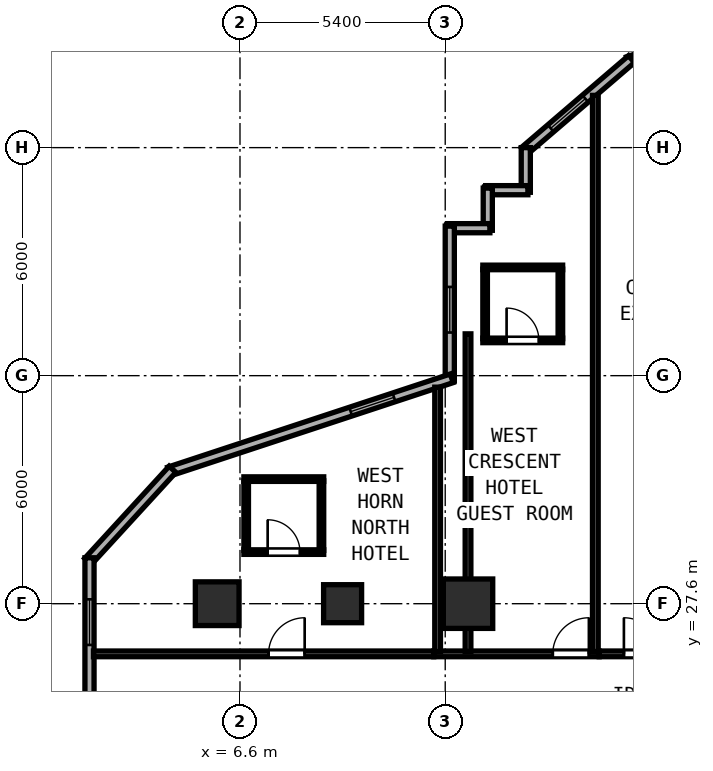
"""IFC4 building model, lengths in metres.
Left out: names, types, materials, properties, quantities, classifications, styles, units other than length and angle.
Written with IfcOpenShell. Run it as: python <this file> out.ifc"""

import sys

from ifc_helpers import new_model, si_unit, direction, frame, frame_2d, origin, origin_2d, place, context, subcontext, project, spatial, rectangle, hollow_rectangle, extrude, element, fill, save


model = new_model("IFC4")
c1 = context("Model", 3, precision=1e-05, world=origin(), true_north=direction((0.0, 1.0)))
c2 = subcontext(c1, "Body", "Model", "MODEL_VIEW")
j1 = project(units=[si_unit("LENGTHUNIT", "METRE"), si_unit("PLANEANGLEUNIT", "RADIAN")], contexts=[c1])
p1 = place(None, origin())
s1 = spatial("IfcSite", under=j1, at=p1, CompositionType="ELEMENT")
p2 = place(p1, origin())
s2 = spatial("IfcBuilding", under=s1, at=p2, CompositionType="ELEMENT")
p3 = place(p2, frame((0.0, 0.0, 39.2)))
s3 = spatial("IfcBuildingStorey", under=s2, at=p3, CompositionType="ELEMENT", Elevation=39.2)
p4 = place(p3, frame((12.6, 27.6, 0.0), z_axis=(0.0, 0.0, 1.0), x_axis=(1.0, 0.0, 0.0)))
e1 = element("IfcColumn", 1, at=p4, inside=s3, PredefinedType="COLUMN", context=c2, shape_type="SweptSolid", body=[
    extrude(hollow_rectangle(XDim=1.3, YDim=1.3, WallThickness=0.048, at=origin_2d()), origin(), (0.0, 0.0, 1.0), 3.8),
])
p5 = place(p3, frame((6.0, 27.6, 0.0), z_axis=(0.0, 0.0, 1.0), x_axis=(1.0, 0.0, 0.0)))
e2 = element("IfcColumn", 2, at=p5, inside=s3, PredefinedType="COLUMN", context=c2, shape_type="SweptSolid", body=[
    extrude(hollow_rectangle(XDim=1.15, YDim=1.15, WallThickness=0.042, at=origin_2d()), origin(), (0.0, 0.0, 1.0), 3.8),
])
p6 = place(p3, frame((9.3, 27.6, 0.0), z_axis=(0.0, 0.0, 1.0), x_axis=(1.0, 0.0, 0.0)))
e3 = element("IfcColumn", 3, at=p6, inside=s3, PredefinedType="COLUMN", context=c2, shape_type="SweptSolid", body=[
    extrude(hollow_rectangle(XDim=1.0, YDim=1.0, WallThickness=0.038, at=origin_2d()), origin(), (0.0, 0.0, 1.0), 3.8),
])
p7 = place(p3, frame((17.808, 42.209, 0.0), z_axis=(0.0, 0.0, 1.0), x_axis=(-0.948706457285, -0.316158279832, 0.0)))
e4 = element("IfcWall", 4, at=p7, inside=s3, PredefinedType="SOLIDWALL", context=c2, shape_type="SweptSolid", body=[
    extrude(rectangle(XDim=1.054, YDim=0.24, at=frame_2d((0.527, 0.0))), origin(), (0.0, 0.0, 1.0), 3.54),
])
p8 = place(p3, frame((16.902, 41.929, 0.0), z_axis=(0.0, 0.0, 1.0), x_axis=(-0.759275136126, -0.650769750112, 0.0)))
e5 = element("IfcWall", 5, at=p8, inside=s3, PredefinedType="SOLIDWALL", context=c2, shape_type="SweptSolid", body=[
    extrude(rectangle(XDim=3.719, YDim=0.24, at=frame_2d((1.86, 0.0))), origin(), (0.0, 0.0, 1.0), 3.54),
])
p9 = place(p8, frame((1.6, 0.0, 0.85)))
e6 = element("IfcOpeningElement", 6, at=p9, cuts=e5, PredefinedType="OPENING", context=c2, shape_type="SweptSolid", body=[
    extrude(rectangle(XDim=1.2, YDim=1.85, at=frame_2d((0.6, 0.925))), frame((0.0, 0.13, 0.0), z_axis=(0.0, -1.0, 0.0), x_axis=(1.0, 0.0, 0.0)), (0.0, 0.0, 1.0), 0.26),
])
p10 = place(p3, frame((14.12, 39.6, 0.0), z_axis=(0.0, 0.0, 1.0), x_axis=(0.0, -1.0, 0.0)))
e7 = element("IfcWall", 7, at=p10, inside=s3, PredefinedType="SOLIDWALL", context=c2, shape_type="SweptSolid", body=[
    extrude(rectangle(XDim=1.175, YDim=0.24, at=frame_2d((0.587, 0.0))), origin(), (0.0, 0.0, 1.0), 3.54),
])
p11 = place(p3, frame((14.175, 38.48, 0.0), z_axis=(0.0, 0.0, 1.0), x_axis=(-1.0, 0.0, 0.0)))
e8 = element("IfcWall", 8, at=p11, inside=s3, PredefinedType="SOLIDWALL", context=c2, shape_type="SweptSolid", body=[
    extrude(rectangle(XDim=1.11, YDim=0.24, at=frame_2d((0.555, 0.0))), origin(), (0.0, 0.0, 1.0), 3.54),
])
p12 = place(p3, frame((13.12, 38.535, 0.0), z_axis=(0.0, 0.0, 1.0), x_axis=(0.0, -1.0, 0.0)))
e9 = element("IfcWall", 9, at=p12, inside=s3, PredefinedType="SOLIDWALL", context=c2, shape_type="SweptSolid", body=[
    extrude(rectangle(XDim=1.11, YDim=0.24, at=frame_2d((0.555, 0.0))), origin(), (0.0, 0.0, 1.0), 3.54),
])
p13 = place(p3, frame((13.175, 37.48, 0.0), z_axis=(0.0, 0.0, 1.0), x_axis=(-1.0, 0.0, 0.0)))
e10 = element("IfcWall", 10, at=p13, inside=s3, PredefinedType="SOLIDWALL", context=c2, shape_type="SweptSolid", body=[
    extrude(rectangle(XDim=1.11, YDim=0.24, at=frame_2d((0.555, 0.0))), origin(), (0.0, 0.0, 1.0), 3.54),
])
p14 = place(p3, frame((12.12, 37.535, 0.0), z_axis=(0.0, 0.0, 1.0), x_axis=(0.0, -1.0, 0.0)))
e11 = element("IfcWall", 11, at=p14, inside=s3, PredefinedType="SOLIDWALL", context=c2, shape_type="SweptSolid", body=[
    extrude(rectangle(XDim=4.077, YDim=0.24, at=frame_2d((2.038, 0.0))), origin(), (0.0, 0.0, 1.0), 3.54),
])
p15 = place(p14, frame((1.6, 0.0, 0.85)))
e12 = element("IfcOpeningElement", 12, at=p15, cuts=e11, PredefinedType="OPENING", context=c2, shape_type="SweptSolid", body=[
    extrude(rectangle(XDim=1.2, YDim=1.85, at=frame_2d((0.6, 0.925))), frame((0.0, 0.13, 0.0), z_axis=(0.0, -1.0, 0.0), x_axis=(1.0, 0.0, 0.0)), (0.0, 0.0, 1.0), 0.26),
])
p16 = place(p3, frame((12.172, 33.531, 0.0), z_axis=(0.0, 0.0, 1.0), x_axis=(-0.949716382283, -0.313111470923, 0.0)))
e13 = element("IfcWall", 13, at=p16, inside=s3, PredefinedType="SOLIDWALL", context=c2, shape_type="SweptSolid", body=[
    extrude(rectangle(XDim=7.831, YDim=0.24, at=frame_2d((3.916, 0.0))), origin(), (0.0, 0.0, 1.0), 3.54),
])
p17 = place(p16, frame((1.6, 0.0, 0.85)))
e14 = element("IfcOpeningElement", 14, at=p17, cuts=e13, PredefinedType="OPENING", context=c2, shape_type="SweptSolid", body=[
    extrude(rectangle(XDim=1.2, YDim=1.85, at=frame_2d((0.6, 0.925))), frame((0.0, 0.13, 0.0), z_axis=(0.0, -1.0, 0.0), x_axis=(1.0, 0.0, 0.0)), (0.0, 0.0, 1.0), 0.26),
])
p18 = place(p3, frame((4.824, 31.136, 0.0), z_axis=(0.0, 0.0, 1.0), x_axis=(-0.675771705575, -0.737110983465, 0.0)))
e15 = element("IfcWall", 15, at=p18, inside=s3, PredefinedType="SOLIDWALL", context=c2, shape_type="SweptSolid", body=[
    extrude(rectangle(XDim=3.288, YDim=0.24, at=frame_2d((1.644, 0.0))), origin(), (0.0, 0.0, 1.0), 3.54),
])
p19 = place(p3, frame((2.64, 28.808, 0.0), z_axis=(0.0, 0.0, 1.0), x_axis=(0.0, -1.0, 0.0)))
e16 = element("IfcWall", 16, at=p19, inside=s3, PredefinedType="SOLIDWALL", context=c2, shape_type="SweptSolid", body=[
    extrude(rectangle(XDim=20.349, YDim=0.24, at=frame_2d((10.175, 0.0))), origin(), (0.0, 0.0, 1.0), 3.54),
])
p20 = place(p19, frame((1.093, 0.0, 0.85)))
e17 = element("IfcOpeningElement", 17, at=p20, cuts=e16, PredefinedType="OPENING", context=c2, shape_type="SweptSolid", body=[
    extrude(rectangle(XDim=1.2, YDim=1.85, at=frame_2d((0.6, 0.925))), frame((0.0, 0.13, 0.0), z_axis=(0.0, -1.0, 0.0), x_axis=(1.0, 0.0, 0.0)), (0.0, 0.0, 1.0), 0.26),
])
p21 = place(p19, frame((7.0, 0.0, 0.85)))
e18 = element("IfcOpeningElement", 18, at=p21, cuts=e16, PredefinedType="OPENING", context=c2, shape_type="SweptSolid", body=[
    extrude(rectangle(XDim=1.2, YDim=1.85, at=frame_2d((0.6, 0.925))), frame((0.0, 0.13, 0.0), z_axis=(0.0, -1.0, 0.0), x_axis=(1.0, 0.0, 0.0)), (0.0, 0.0, 1.0), 0.26),
])
p22 = place(p19, frame((12.4, 0.0, 0.85)))
e19 = element("IfcOpeningElement", 19, at=p22, cuts=e16, PredefinedType="OPENING", context=c2, shape_type="SweptSolid", body=[
    extrude(rectangle(XDim=1.2, YDim=1.85, at=frame_2d((0.6, 0.925))), frame((0.0, 0.13, 0.0), z_axis=(0.0, -1.0, 0.0), x_axis=(1.0, 0.0, 0.0)), (0.0, 0.0, 1.0), 0.26),
])
p23 = place(p19, frame((17.8, 0.0, 0.85)))
e20 = element("IfcOpeningElement", 20, at=p23, cuts=e16, PredefinedType="OPENING", context=c2, shape_type="SweptSolid", body=[
    extrude(rectangle(XDim=1.2, YDim=1.85, at=frame_2d((0.6, 0.925))), frame((0.0, 0.13, 0.0), z_axis=(0.0, -1.0, 0.0), x_axis=(1.0, 0.0, 0.0)), (0.0, 0.0, 1.0), 0.26),
])
p24 = place(p3, frame((11.7, 26.28, 0.0), z_axis=(0.0, 0.0, 1.0), x_axis=(1.0, 0.0, 0.0)))
e21 = element("IfcWall", 21, at=p24, inside=s3, PredefinedType="PARTITIONING", context=c2, shape_type="SweptSolid", body=[
    extrude(rectangle(XDim=4.35, YDim=0.15, at=frame_2d((2.175, 0.0))), origin(), (0.0, 0.0, 1.0), 3.54),
])
p25 = place(p24, frame((3.13, 0.0, 0.0)))
e22 = element("IfcOpeningElement", 22, at=p25, cuts=e21, PredefinedType="OPENING", context=c2, shape_type="SweptSolid", body=[
    extrude(rectangle(XDim=0.95, YDim=2.15, at=frame_2d((0.475, 1.075))), frame((0.0, 0.085, 0.0), z_axis=(0.0, -1.0, 0.0), x_axis=(1.0, 0.0, 0.0)), (0.0, 0.0, 1.0), 0.17),
])
p26 = place(p3, frame((11.8, 26.34, 0.0), z_axis=(0.0, 0.0, 1.0), x_axis=(0.0, 1.0, 0.0)))
e23 = element("IfcWall", 23, at=p26, inside=s3, PredefinedType="PARTITIONING", context=c2, shape_type="SweptSolid", body=[
    extrude(rectangle(XDim=6.957, YDim=0.15, at=frame_2d((3.479, 0.0))), origin(), (0.0, 0.0, 1.0), 3.54),
])
p27 = place(p3, frame((15.95, 26.34, 0.0), z_axis=(0.0, 0.0, 1.0), x_axis=(0.0, 1.0, 0.0)))
e24 = element("IfcWall", 24, at=p27, inside=s3, PredefinedType="PARTITIONING", context=c2, shape_type="SweptSolid", body=[
    extrude(rectangle(XDim=14.635, YDim=0.15, at=frame_2d((7.317, 0.0))), origin(), (0.0, 0.0, 1.0), 3.54),
])
p28 = place(p3, frame((12.99, 36.448, 0.0), z_axis=(0.0, 0.0, 1.0), x_axis=(1.0, 0.0, 0.0)))
e25 = element("IfcWall", 25, at=p28, inside=s3, PredefinedType="PARTITIONING", context=c2, shape_type="SweptSolid", body=[
    extrude(rectangle(XDim=2.1, YDim=0.12, at=frame_2d((1.05, 0.0))), origin(), (0.0, 0.0, 1.0), 3.54),
])
p29 = place(p3, frame((12.99, 34.528, 0.0), z_axis=(0.0, 0.0, 1.0), x_axis=(1.0, 0.0, 0.0)))
e26 = element("IfcWall", 26, at=p29, inside=s3, PredefinedType="PARTITIONING", context=c2, shape_type="SweptSolid", body=[
    extrude(rectangle(XDim=2.1, YDim=0.12, at=frame_2d((1.05, 0.0))), origin(), (0.0, 0.0, 1.0), 3.54),
])
p30 = place(p29, frame((0.625, 0.0, 0.0)))
e27 = element("IfcOpeningElement", 27, at=p30, cuts=e26, PredefinedType="OPENING", context=c2, shape_type="SweptSolid", body=[
    extrude(rectangle(XDim=0.85, YDim=2.1, at=frame_2d((0.425, 1.05))), frame((0.0, 0.07, 0.0), z_axis=(0.0, -1.0, 0.0), x_axis=(1.0, 0.0, 0.0)), (0.0, 0.0, 1.0), 0.14),
])
for number, where, z_axis, x_axis in (
    (28, (13.05, 34.573, 0.0), (0.0, 0.0, 1.0), (0.0, 1.0, 0.0)),
    (29, (15.03, 34.573, 0.0), (0.0, 0.0, 1.0), (0.0, 1.0, 0.0)),
):
    element("IfcWall", number, at=place(p3, frame(where, z_axis=z_axis, x_axis=x_axis)), inside=s3, PredefinedType="PARTITIONING", context=c2, shape_type="SweptSolid", body=[
        extrude(rectangle(XDim=1.83, YDim=0.12, at=frame_2d((0.915, 0.0))), origin(), (0.0, 0.0, 1.0), 3.54),
    ])
p31 = place(p3, frame((16.052, 26.28, 0.0), z_axis=(0.0, 0.0, 1.0), x_axis=(1.0, 0.0, 0.0)))
e30 = element("IfcWall", 30, at=p31, inside=s3, PredefinedType="PARTITIONING", context=c2, shape_type="SweptSolid", body=[
    extrude(rectangle(XDim=4.018, YDim=0.15, at=frame_2d((2.009, 0.0))), origin(), (0.0, 0.0, 1.0), 3.54),
])
p32 = place(p31, frame((0.649, 0.0, 0.0)))
e31 = element("IfcOpeningElement", 31, at=p32, cuts=e30, PredefinedType="OPENING", context=c2, shape_type="SweptSolid", body=[
    extrude(rectangle(XDim=0.95, YDim=2.18, at=frame_2d((0.475, 1.09))), frame((0.0, 0.085, 0.0), z_axis=(0.0, -1.0, 0.0), x_axis=(1.0, 0.0, 0.0)), (0.0, 0.0, 1.0), 0.17),
])
p33 = place(p3, frame((2.745, 26.28, 0.0), z_axis=(0.0, 0.0, 1.0), x_axis=(1.0, 0.0, 0.0)))
e32 = element("IfcWall", 32, at=p33, inside=s3, PredefinedType="PARTITIONING", context=c2, shape_type="SweptSolid", body=[
    extrude(rectangle(XDim=8.953, YDim=0.15, at=frame_2d((4.477, 0.0))), origin(), (0.0, 0.0, 1.0), 3.54),
])
p34 = place(p33, frame((4.607, 0.0, 0.0)))
e33 = element("IfcOpeningElement", 33, at=p34, cuts=e32, PredefinedType="OPENING", context=c2, shape_type="SweptSolid", body=[
    extrude(rectangle(XDim=0.95, YDim=2.15, at=frame_2d((0.475, 1.075))), frame((0.0, 0.085, 0.0), z_axis=(0.0, -1.0, 0.0), x_axis=(1.0, 0.0, 0.0)), (0.0, 0.0, 1.0), 0.17),
])
p35 = place(p3, frame((12.6, 26.34, 0.0), z_axis=(0.0, 0.0, 1.0), x_axis=(0.0, 1.0, 0.0)))
e34 = element("IfcWall", 34, at=p35, inside=s3, PredefinedType="PARTITIONING", context=c2, shape_type="SweptSolid", body=[
    extrude(rectangle(XDim=8.36, YDim=0.15, at=frame_2d((4.18, 0.0))), origin(), (0.0, 0.0, 1.0), 3.037),
])
p36 = place(p3, frame((6.703, 30.878, 0.0), z_axis=(0.0, 0.0, 1.0), x_axis=(1.0, 0.0, 0.0)))
e35 = element("IfcWall", 35, at=p36, inside=s3, PredefinedType="PARTITIONING", context=c2, shape_type="SweptSolid", body=[
    extrude(rectangle(XDim=2.1, YDim=0.12, at=frame_2d((1.05, 0.0))), origin(), (0.0, 0.0, 1.0), 3.54),
])
p37 = place(p3, frame((6.703, 28.958, 0.0), z_axis=(0.0, 0.0, 1.0), x_axis=(1.0, 0.0, 0.0)))
e36 = element("IfcWall", 36, at=p37, inside=s3, PredefinedType="PARTITIONING", context=c2, shape_type="SweptSolid", body=[
    extrude(rectangle(XDim=2.1, YDim=0.12, at=frame_2d((1.05, 0.0))), origin(), (0.0, 0.0, 1.0), 3.54),
])
p38 = place(p37, frame((0.625, 0.0, 0.0)))
e37 = element("IfcOpeningElement", 37, at=p38, cuts=e36, PredefinedType="OPENING", context=c2, shape_type="SweptSolid", body=[
    extrude(rectangle(XDim=0.85, YDim=2.1, at=frame_2d((0.425, 1.05))), frame((0.0, 0.07, 0.0), z_axis=(0.0, -1.0, 0.0), x_axis=(1.0, 0.0, 0.0)), (0.0, 0.0, 1.0), 0.14),
])
for number, where, z_axis, x_axis in (
    (38, (6.763, 29.003, 0.0), (0.0, 0.0, 1.0), (0.0, 1.0, 0.0)),
    (39, (8.743, 29.003, 0.0), (0.0, 0.0, 1.0), (0.0, 1.0, 0.0)),
):
    element("IfcWall", number, at=place(p3, frame(where, z_axis=z_axis, x_axis=x_axis)), inside=s3, PredefinedType="PARTITIONING", context=c2, shape_type="SweptSolid", body=[
        extrude(rectangle(XDim=1.83, YDim=0.12, at=frame_2d((0.915, 0.0))), origin(), (0.0, 0.0, 1.0), 3.54),
    ])
p39 = place(p9, origin())
e40 = element("IfcWindow", 40, at=p39, inside=s3, PartitioningType="SINGLE_PANEL", PredefinedType="WINDOW", context=c2, shape_type="SweptSolid", body=[
    extrude(rectangle(XDim=1.2, YDim=1.85, at=frame_2d((0.6, 0.925))), frame((0.0, 0.03, 0.0), z_axis=(0.0, -1.0, 0.0), x_axis=(1.0, 0.0, 0.0)), (0.0, 0.0, 1.0), 0.06),
])
fill(e6, e40)
p40 = place(p15, origin())
e41 = element("IfcWindow", 41, at=p40, inside=s3, PartitioningType="SINGLE_PANEL", PredefinedType="WINDOW", context=c2, shape_type="SweptSolid", body=[
    extrude(rectangle(XDim=1.2, YDim=1.85, at=frame_2d((0.6, 0.925))), frame((0.0, 0.03, 0.0), z_axis=(0.0, -1.0, 0.0), x_axis=(1.0, 0.0, 0.0)), (0.0, 0.0, 1.0), 0.06),
])
fill(e12, e41)
p41 = place(p17, origin())
e42 = element("IfcWindow", 42, at=p41, inside=s3, PartitioningType="SINGLE_PANEL", PredefinedType="WINDOW", context=c2, shape_type="SweptSolid", body=[
    extrude(rectangle(XDim=1.2, YDim=1.85, at=frame_2d((0.6, 0.925))), frame((0.0, 0.03, 0.0), z_axis=(0.0, -1.0, 0.0), x_axis=(1.0, 0.0, 0.0)), (0.0, 0.0, 1.0), 0.06),
])
fill(e14, e42)
p42 = place(p20, origin())
e43 = element("IfcWindow", 43, at=p42, inside=s3, PartitioningType="SINGLE_PANEL", PredefinedType="WINDOW", context=c2, shape_type="SweptSolid", body=[
    extrude(rectangle(XDim=1.2, YDim=1.85, at=frame_2d((0.6, 0.925))), frame((0.0, 0.03, 0.0), z_axis=(0.0, -1.0, 0.0), x_axis=(1.0, 0.0, 0.0)), (0.0, 0.0, 1.0), 0.06),
])
fill(e17, e43)
p43 = place(p25, origin())
e44 = element("IfcDoor", 44, at=p43, inside=s3, OperationType="SINGLE_SWING_RIGHT", PredefinedType="DOOR", context=c2, shape_type="SweptSolid", body=[
    extrude(rectangle(XDim=0.95, YDim=2.15, at=frame_2d((0.475, 1.075))), frame((0.0, 0.025, 0.0), z_axis=(0.0, -1.0, 0.0), x_axis=(1.0, 0.0, 0.0)), (0.0, 0.0, 1.0), 0.05),
])
fill(e22, e44)
p44 = place(p30, origin())
e45 = element("IfcDoor", 45, at=p44, inside=s3, OperationType="SINGLE_SWING_LEFT", PredefinedType="DOOR", context=c2, shape_type="SweptSolid", body=[
    extrude(rectangle(XDim=0.85, YDim=2.1, at=frame_2d((0.425, 1.05))), frame((0.0, 0.025, 0.0), z_axis=(0.0, -1.0, 0.0), x_axis=(1.0, 0.0, 0.0)), (0.0, 0.0, 1.0), 0.05),
])
fill(e27, e45)
p45 = place(p32, origin())
e46 = element("IfcDoor", 46, at=p45, inside=s3, OperationType="SINGLE_SWING_LEFT", PredefinedType="DOOR", context=c2, shape_type="SweptSolid", body=[
    extrude(rectangle(XDim=0.95, YDim=2.18, at=frame_2d((0.475, 1.09))), frame((0.0, 0.025, 0.0), z_axis=(0.0, -1.0, 0.0), x_axis=(1.0, 0.0, 0.0)), (0.0, 0.0, 1.0), 0.05),
])
fill(e31, e46)
p46 = place(p34, origin())
e47 = element("IfcDoor", 47, at=p46, inside=s3, OperationType="SINGLE_SWING_RIGHT", PredefinedType="DOOR", context=c2, shape_type="SweptSolid", body=[
    extrude(rectangle(XDim=0.95, YDim=2.15, at=frame_2d((0.475, 1.075))), frame((0.0, 0.025, 0.0), z_axis=(0.0, -1.0, 0.0), x_axis=(1.0, 0.0, 0.0)), (0.0, 0.0, 1.0), 0.05),
])
fill(e33, e47)
p47 = place(p38, origin())
e48 = element("IfcDoor", 48, at=p47, inside=s3, OperationType="SINGLE_SWING_LEFT", PredefinedType="DOOR", context=c2, shape_type="SweptSolid", body=[
    extrude(rectangle(XDim=0.85, YDim=2.1, at=frame_2d((0.425, 1.05))), frame((0.0, 0.025, 0.0), z_axis=(0.0, -1.0, 0.0), x_axis=(1.0, 0.0, 0.0)), (0.0, 0.0, 1.0), 0.05),
])
fill(e37, e48)
save(model, sys.argv[1])
